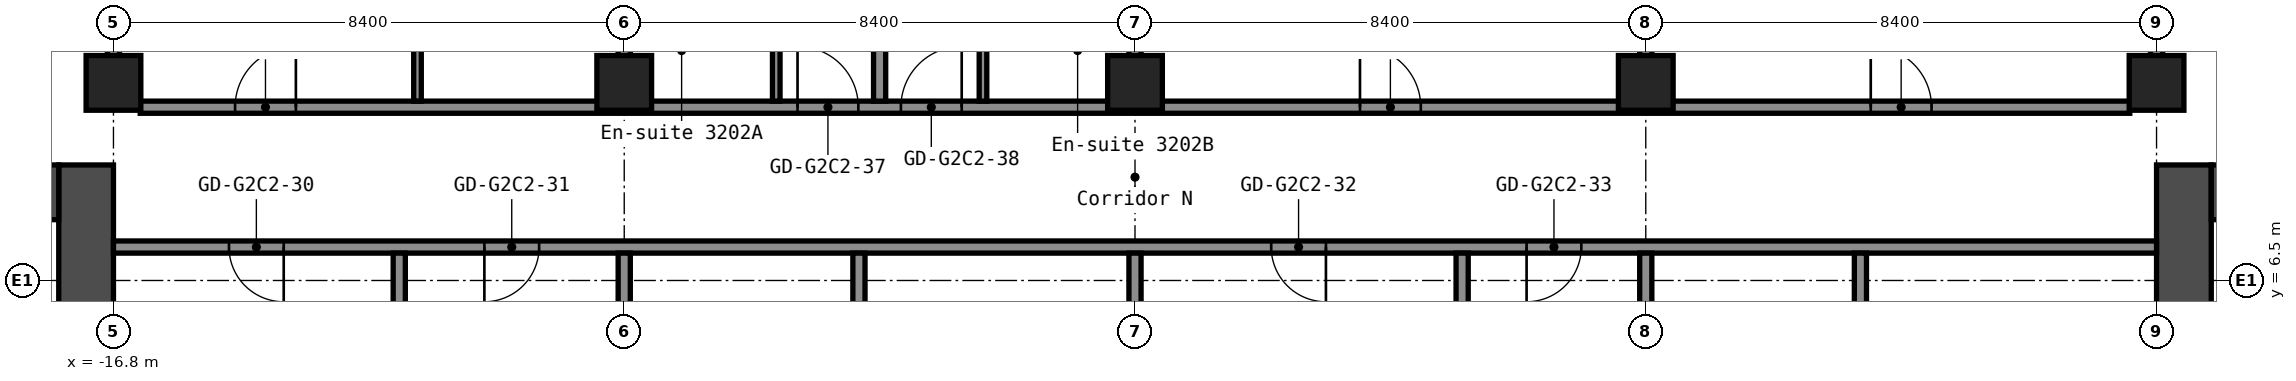
"""IFC4 building model, lengths in metres.
Left out: names, types, materials, properties, quantities, classifications, styles, units other than length and angle.
Written with IfcOpenShell. Run it as: python <this file> out.ifc"""

import sys

from ifc_helpers import new_model, si_unit, direction, frame, frame_2d, origin, origin_2d, place, context, subcontext, project, spatial, rectangle, hollow_rectangle, extrude, element, fill, save


model = new_model("IFC4")
c1 = context("Model", 3, precision=1e-05, world=origin(), true_north=direction((0.0, 1.0)))
c2 = subcontext(c1, "Body", "Model", "MODEL_VIEW")
j1 = project(units=[si_unit("LENGTHUNIT", "METRE"), si_unit("PLANEANGLEUNIT", "RADIAN")], contexts=[c1])
p1 = place(None, origin())
s1 = spatial("IfcSite", under=j1, at=p1, CompositionType="ELEMENT")
p2 = place(p1, origin())
s2 = spatial("IfcBuilding", under=s1, at=p2, CompositionType="ELEMENT")
p3 = place(p2, frame((0.0, 0.0, 113.8)))
s3 = spatial("IfcBuildingStorey", under=s2, at=p3, CompositionType="ELEMENT", Elevation=113.8)
for number, where, z_axis, x_axis in (
    (1, (-16.8, 9.75, 0.0), (0.0, 0.0, 1.0), (1.0, 0.0, 0.0)),
    (2, (-8.4, 9.75, 0.0), (0.0, 0.0, 1.0), (1.0, 0.0, 0.0)),
    (3, (0.0, 9.75, 0.0), (0.0, 0.0, 1.0), (1.0, 0.0, 0.0)),
    (4, (8.4, 9.75, 0.0), (0.0, 0.0, 1.0), (1.0, 0.0, 0.0)),
    (5, (16.8, 9.75, 0.0), (0.0, 0.0, 1.0), (1.0, 0.0, 0.0)),
):
    element("IfcColumn", number, at=place(p3, frame(where, z_axis=z_axis, x_axis=x_axis)), inside=s3, PredefinedType="COLUMN", context=c2, shape_type="SweptSolid", body=[
        extrude(hollow_rectangle(XDim=0.9, YDim=0.9, WallThickness=0.036, at=origin_2d()), origin(), (0.0, 0.0, 1.0), 2.8),
    ])
p4 = place(p3, frame((-17.25, -8.4, 0.0), z_axis=(0.0, 0.0, 1.0), x_axis=(0.0, 1.0, 0.0)))
e6 = element("IfcWall", 6, at=p4, inside=s3, PredefinedType="SHEAR", context=c2, shape_type="SweptSolid", body=[
    extrude(rectangle(XDim=16.8, YDim=0.9, at=frame_2d((8.4, 0.0))), origin(), (0.0, 0.0, 1.0), 2.8),
])
p5 = place(p4, frame((7.6, 0.0, 0.0)))
e7 = element("IfcOpeningElement", 7, at=p5, cuts=e6, PredefinedType="OPENING", context=c2, shape_type="SweptSolid", body=[
    extrude(rectangle(XDim=1.2, YDim=2.1, at=frame_2d((0.6, 1.05))), frame((0.0, 0.46, 0.0), z_axis=(0.0, -1.0, 0.0), x_axis=(1.0, 0.0, 0.0)), (0.0, 0.0, 1.0), 0.92),
])
p6 = place(p3, frame((-32.7, 7.95, 0.0), z_axis=(0.0, 0.0, 1.0), x_axis=(1.0, 0.0, 0.0)))
e8 = element("IfcWall", 8, at=p6, inside=s3, PredefinedType="SHEAR", context=c2, shape_type="SweptSolid", body=[
    extrude(rectangle(XDim=15.0, YDim=0.9, at=frame_2d((7.5, 0.0))), origin(), (0.0, 0.0, 1.0), 2.8),
])
p7 = place(p6, frame((3.4, 0.0, 0.0)))
e9 = element("IfcOpeningElement", 9, at=p7, cuts=e8, PredefinedType="OPENING", context=c2, shape_type="SweptSolid", body=[
    extrude(rectangle(XDim=1.2, YDim=2.1, at=frame_2d((0.6, 1.05))), frame((0.0, 0.46, 0.0), z_axis=(0.0, -1.0, 0.0), x_axis=(1.0, 0.0, 0.0)), (0.0, 0.0, 1.0), 0.92),
])
p8 = place(p6, frame((0.75, 0.0, 0.0)))
e10 = element("IfcOpeningElement", 10, at=p8, cuts=e8, PredefinedType="OPENING", context=c2, shape_type="SweptSolid", body=[
    extrude(rectangle(XDim=0.9, YDim=2.1, at=frame_2d((0.45, 1.05))), frame((0.0, 0.46, 0.0), z_axis=(0.0, -1.0, 0.0), x_axis=(1.0, 0.0, 0.0)), (0.0, 0.0, 1.0), 0.92),
])
p9 = place(p3, frame((17.25, -8.4, 0.0), z_axis=(0.0, 0.0, 1.0), x_axis=(0.0, 1.0, 0.0)))
e11 = element("IfcWall", 11, at=p9, inside=s3, PredefinedType="SHEAR", context=c2, shape_type="SweptSolid", body=[
    extrude(rectangle(XDim=16.8, YDim=0.9, at=frame_2d((8.4, 0.0))), origin(), (0.0, 0.0, 1.0), 2.8),
])
p10 = place(p9, frame((7.6, 0.0, 0.0)))
e12 = element("IfcOpeningElement", 12, at=p10, cuts=e11, PredefinedType="OPENING", context=c2, shape_type="SweptSolid", body=[
    extrude(rectangle(XDim=1.2, YDim=2.1, at=frame_2d((0.6, 1.05))), frame((0.0, 0.46, 0.0), z_axis=(0.0, -1.0, 0.0), x_axis=(1.0, 0.0, 0.0)), (0.0, 0.0, 1.0), 0.92),
])
p11 = place(p3, frame((17.7, 7.95, 0.0), z_axis=(0.0, 0.0, 1.0), x_axis=(1.0, 0.0, 0.0)))
e13 = element("IfcWall", 13, at=p11, inside=s3, PredefinedType="SHEAR", context=c2, shape_type="SweptSolid", body=[
    extrude(rectangle(XDim=15.0, YDim=0.9, at=frame_2d((7.5, 0.0))), origin(), (0.0, 0.0, 1.0), 2.8),
])
p12 = place(p11, frame((10.4, 0.0, 0.0)))
e14 = element("IfcOpeningElement", 14, at=p12, cuts=e13, PredefinedType="OPENING", context=c2, shape_type="SweptSolid", body=[
    extrude(rectangle(XDim=1.2, YDim=2.1, at=frame_2d((0.6, 1.05))), frame((0.0, 0.46, 0.0), z_axis=(0.0, -1.0, 0.0), x_axis=(1.0, 0.0, 0.0)), (0.0, 0.0, 1.0), 0.92),
])
p13 = place(p11, frame((13.35, 0.0, 0.0)))
e15 = element("IfcOpeningElement", 15, at=p13, cuts=e13, PredefinedType="OPENING", context=c2, shape_type="SweptSolid", body=[
    extrude(rectangle(XDim=0.9, YDim=2.1, at=frame_2d((0.45, 1.05))), frame((0.0, 0.46, 0.0), z_axis=(0.0, -1.0, 0.0), x_axis=(1.0, 0.0, 0.0)), (0.0, 0.0, 1.0), 0.92),
])
p14 = place(p3, frame((-16.8, 7.05, 0.0), z_axis=(0.0, 0.0, 1.0), x_axis=(1.0, 0.0, 0.0)))
e16 = element("IfcWall", 16, at=p14, inside=s3, PredefinedType="PARTITIONING", context=c2, shape_type="SweptSolid", body=[
    extrude(rectangle(XDim=33.6, YDim=0.2, at=frame_2d((16.8, 0.0))), origin(), (0.0, 0.0, 1.0), 2.8),
])
p15 = place(p14, frame((1.9, 0.0, 0.0)))
e17 = element("IfcOpeningElement", 17, at=p15, cuts=e16, PredefinedType="OPENING", context=c2, shape_type="SweptSolid", body=[
    extrude(rectangle(XDim=0.9, YDim=2.1, at=frame_2d((0.45, 1.05))), frame((0.0, 0.11, 0.0), z_axis=(0.0, -1.0, 0.0), x_axis=(1.0, 0.0, 0.0)), (0.0, 0.0, 1.0), 0.22),
])
p16 = place(p14, frame((6.1, 0.0, 0.0)))
e18 = element("IfcOpeningElement", 18, at=p16, cuts=e16, PredefinedType="OPENING", context=c2, shape_type="SweptSolid", body=[
    extrude(rectangle(XDim=0.9, YDim=2.1, at=frame_2d((0.45, 1.05))), frame((0.0, 0.11, 0.0), z_axis=(0.0, -1.0, 0.0), x_axis=(1.0, 0.0, 0.0)), (0.0, 0.0, 1.0), 0.22),
])
p17 = place(p14, frame((19.04, 0.0, 0.0)))
e19 = element("IfcOpeningElement", 19, at=p17, cuts=e16, PredefinedType="OPENING", context=c2, shape_type="SweptSolid", body=[
    extrude(rectangle(XDim=0.9, YDim=2.1, at=frame_2d((0.45, 1.05))), frame((0.0, 0.11, 0.0), z_axis=(0.0, -1.0, 0.0), x_axis=(1.0, 0.0, 0.0)), (0.0, 0.0, 1.0), 0.22),
])
p18 = place(p14, frame((23.24, 0.0, 0.0)))
e20 = element("IfcOpeningElement", 20, at=p18, cuts=e16, PredefinedType="OPENING", context=c2, shape_type="SweptSolid", body=[
    extrude(rectangle(XDim=0.9, YDim=2.1, at=frame_2d((0.45, 1.05))), frame((0.0, 0.11, 0.0), z_axis=(0.0, -1.0, 0.0), x_axis=(1.0, 0.0, 0.0)), (0.0, 0.0, 1.0), 0.22),
])
p19 = place(p3, frame((-16.36, 9.35, 0.0), z_axis=(0.0, 0.0, 1.0), x_axis=(1.0, 0.0, 0.0)))
e21 = element("IfcWall", 21, at=p19, inside=s3, PredefinedType="PARTITIONING", context=c2, shape_type="SweptSolid", body=[
    extrude(rectangle(XDim=32.72, YDim=0.2, at=frame_2d((16.36, 0.0))), origin(), (0.0, 0.0, 1.0), 2.8),
])
p20 = place(p19, frame((1.56, 0.0, 0.0)))
e22 = element("IfcOpeningElement", 22, at=p20, cuts=e21, PredefinedType="OPENING", context=c2, shape_type="SweptSolid", body=[
    extrude(rectangle(XDim=1.0, YDim=2.1, at=frame_2d((0.5, 1.05))), frame((0.0, 0.11, 0.0), z_axis=(0.0, -1.0, 0.0), x_axis=(1.0, 0.0, 0.0)), (0.0, 0.0, 1.0), 0.22),
])
p21 = place(p19, frame((10.81, 0.0, 0.0)))
e23 = element("IfcOpeningElement", 23, at=p21, cuts=e21, PredefinedType="OPENING", context=c2, shape_type="SweptSolid", body=[
    extrude(rectangle(XDim=1.0, YDim=2.1, at=frame_2d((0.5, 1.05))), frame((0.0, 0.11, 0.0), z_axis=(0.0, -1.0, 0.0), x_axis=(1.0, 0.0, 0.0)), (0.0, 0.0, 1.0), 0.22),
])
p22 = place(p19, frame((12.51, 0.0, 0.0)))
e24 = element("IfcOpeningElement", 24, at=p22, cuts=e21, PredefinedType="OPENING", context=c2, shape_type="SweptSolid", body=[
    extrude(rectangle(XDim=1.0, YDim=2.1, at=frame_2d((0.5, 1.05))), frame((0.0, 0.11, 0.0), z_axis=(0.0, -1.0, 0.0), x_axis=(1.0, 0.0, 0.0)), (0.0, 0.0, 1.0), 0.22),
])
p23 = place(p19, frame((20.06, 0.0, 0.0)))
e25 = element("IfcOpeningElement", 25, at=p23, cuts=e21, PredefinedType="OPENING", context=c2, shape_type="SweptSolid", body=[
    extrude(rectangle(XDim=1.0, YDim=2.1, at=frame_2d((0.5, 1.05))), frame((0.0, 0.11, 0.0), z_axis=(0.0, -1.0, 0.0), x_axis=(1.0, 0.0, 0.0)), (0.0, 0.0, 1.0), 0.22),
])
p24 = place(p19, frame((28.46, 0.0, 0.0)))
e26 = element("IfcOpeningElement", 26, at=p24, cuts=e21, PredefinedType="OPENING", context=c2, shape_type="SweptSolid", body=[
    extrude(rectangle(XDim=1.0, YDim=2.1, at=frame_2d((0.5, 1.05))), frame((0.0, 0.11, 0.0), z_axis=(0.0, -1.0, 0.0), x_axis=(1.0, 0.0, 0.0)), (0.0, 0.0, 1.0), 0.22),
])
p25 = place(p3, frame((-16.8, 10.19, 0.0), z_axis=(0.0, 0.0, 1.0), x_axis=(0.0, 1.0, 0.0)))
e27 = element("IfcWall", 27, at=p25, inside=s3, PredefinedType="PARTITIONING", context=c2, shape_type="SweptSolid", body=[
    extrude(rectangle(XDim=13.36, YDim=0.2, at=frame_2d((6.68, 0.0))), origin(), (0.0, 0.0, 1.0), 2.8),
])
p26 = place(p3, frame((-12.1, 1.05, 0.0), z_axis=(0.0, 0.0, 1.0), x_axis=(0.0, 1.0, 0.0)))
e28 = element("IfcWall", 28, at=p26, inside=s3, PredefinedType="PARTITIONING", context=c2, shape_type="SweptSolid", body=[
    extrude(rectangle(XDim=5.9, YDim=0.2, at=frame_2d((2.95, 0.0))), origin(), (0.0, 0.0, 1.0), 2.8),
])
p27 = place(p3, frame((-11.8, 9.45, 0.0), z_axis=(0.0, 0.0, 1.0), x_axis=(0.0, 1.0, 0.0)))
e29 = element("IfcWall", 29, at=p27, inside=s3, PredefinedType="PARTITIONING", context=c2, shape_type="SweptSolid", body=[
    extrude(rectangle(XDim=3.3, YDim=0.125, at=frame_2d((1.65, 0.0))), origin(), (0.0, 0.0, 1.0), 2.8),
])
p28 = place(p3, frame((-8.4, 1.05, 0.0), z_axis=(0.0, 0.0, 1.0), x_axis=(0.0, 1.0, 0.0)))
e30 = element("IfcWall", 30, at=p28, inside=s3, PredefinedType="PARTITIONING", context=c2, shape_type="SweptSolid", body=[
    extrude(rectangle(XDim=5.9, YDim=0.2, at=frame_2d((2.95, 0.0))), origin(), (0.0, 0.0, 1.0), 2.8),
])
p29 = place(p3, frame((-8.4, 10.19, 0.0), z_axis=(0.0, 0.0, 1.0), x_axis=(0.0, 1.0, 0.0)))
e31 = element("IfcWall", 31, at=p29, inside=s3, PredefinedType="PARTITIONING", context=c2, shape_type="SweptSolid", body=[
    extrude(rectangle(XDim=13.36, YDim=0.2, at=frame_2d((6.68, 0.0))), origin(), (0.0, 0.0, 1.0), 2.8),
])
p30 = place(p3, frame((-5.9, 9.45, 0.0), z_axis=(0.0, 0.0, 1.0), x_axis=(0.0, 1.0, 0.0)))
e32 = element("IfcWall", 32, at=p30, inside=s3, PredefinedType="PARTITIONING", context=c2, shape_type="SweptSolid", body=[
    extrude(rectangle(XDim=2.9, YDim=0.125, at=frame_2d((1.45, 0.0))), origin(), (0.0, 0.0, 1.0), 2.8),
])
p31 = place(p30, frame((1.5, 0.0, 0.0)))
e33 = element("IfcOpeningElement", 33, at=p31, cuts=e32, PredefinedType="OPENING", context=c2, shape_type="SweptSolid", body=[
    extrude(rectangle(XDim=0.8, YDim=2.1, at=frame_2d((0.4, 1.05))), frame((0.0, 0.073, 0.0), z_axis=(0.0, -1.0, 0.0), x_axis=(1.0, 0.0, 0.0)), (0.0, 0.0, 1.0), 0.145),
])
p32 = place(p3, frame((-4.54, 1.05, 0.0), z_axis=(0.0, 0.0, 1.0), x_axis=(0.0, 1.0, 0.0)))
e34 = element("IfcWall", 34, at=p32, inside=s3, PredefinedType="PARTITIONING", context=c2, shape_type="SweptSolid", body=[
    extrude(rectangle(XDim=5.9, YDim=0.2, at=frame_2d((2.95, 0.0))), origin(), (0.0, 0.0, 1.0), 2.8),
])
p33 = place(p3, frame((-4.2, 9.45, 0.0), z_axis=(0.0, 0.0, 1.0), x_axis=(0.0, 1.0, 0.0)))
e35 = element("IfcWall", 35, at=p33, inside=s3, PredefinedType="PARTITIONING", context=c2, shape_type="SweptSolid", body=[
    extrude(rectangle(XDim=14.1, YDim=0.2, at=frame_2d((7.05, 0.0))), origin(), (0.0, 0.0, 1.0), 2.8),
])
p34 = place(p3, frame((-2.5, 9.45, 0.0), z_axis=(0.0, 0.0, 1.0), x_axis=(0.0, 1.0, 0.0)))
e36 = element("IfcWall", 36, at=p34, inside=s3, PredefinedType="PARTITIONING", context=c2, shape_type="SweptSolid", body=[
    extrude(rectangle(XDim=2.9, YDim=0.125, at=frame_2d((1.45, 0.0))), origin(), (0.0, 0.0, 1.0), 2.8),
])
p35 = place(p34, frame((1.5, 0.0, 0.0)))
e37 = element("IfcOpeningElement", 37, at=p35, cuts=e36, PredefinedType="OPENING", context=c2, shape_type="SweptSolid", body=[
    extrude(rectangle(XDim=0.8, YDim=2.1, at=frame_2d((0.4, 1.05))), frame((0.0, 0.073, 0.0), z_axis=(0.0, -1.0, 0.0), x_axis=(1.0, 0.0, 0.0)), (0.0, 0.0, 1.0), 0.145),
])
p36 = place(p3, frame((0.0, 1.05, 0.0), z_axis=(0.0, 0.0, 1.0), x_axis=(0.0, 1.0, 0.0)))
e38 = element("IfcWall", 38, at=p36, inside=s3, PredefinedType="PARTITIONING", context=c2, shape_type="SweptSolid", body=[
    extrude(rectangle(XDim=5.9, YDim=0.2, at=frame_2d((2.95, 0.0))), origin(), (0.0, 0.0, 1.0), 2.8),
])
p37 = place(p3, frame((0.0, 10.19, 0.0), z_axis=(0.0, 0.0, 1.0), x_axis=(0.0, 1.0, 0.0)))
e39 = element("IfcWall", 39, at=p37, inside=s3, PredefinedType="PARTITIONING", context=c2, shape_type="SweptSolid", body=[
    extrude(rectangle(XDim=13.36, YDim=0.2, at=frame_2d((6.68, 0.0))), origin(), (0.0, 0.0, 1.0), 2.8),
])
for number, where, z_axis, x_axis in (
    (40, (5.38, 1.05, 0.0), (0.0, 0.0, 1.0), (0.0, 1.0, 0.0)),
    (41, (8.4, 1.05, 0.0), (0.0, 0.0, 1.0), (0.0, 1.0, 0.0)),
):
    element("IfcWall", number, at=place(p3, frame(where, z_axis=z_axis, x_axis=x_axis)), inside=s3, PredefinedType="PARTITIONING", context=c2, shape_type="SweptSolid", body=[
        extrude(rectangle(XDim=5.9, YDim=0.2, at=frame_2d((2.95, 0.0))), origin(), (0.0, 0.0, 1.0), 2.8),
    ])
p38 = place(p3, frame((8.4, 10.19, 0.0), z_axis=(0.0, 0.0, 1.0), x_axis=(0.0, 1.0, 0.0)))
e42 = element("IfcWall", 42, at=p38, inside=s3, PredefinedType="PARTITIONING", context=c2, shape_type="SweptSolid", body=[
    extrude(rectangle(XDim=13.36, YDim=0.2, at=frame_2d((6.68, 0.0))), origin(), (0.0, 0.0, 1.0), 2.8),
])
p39 = place(p3, frame((11.93, 1.05, 0.0), z_axis=(0.0, 0.0, 1.0), x_axis=(0.0, 1.0, 0.0)))
e43 = element("IfcWall", 43, at=p39, inside=s3, PredefinedType="PARTITIONING", context=c2, shape_type="SweptSolid", body=[
    extrude(rectangle(XDim=5.9, YDim=0.2, at=frame_2d((2.95, 0.0))), origin(), (0.0, 0.0, 1.0), 2.8),
])
p40 = place(p3, frame((16.8, 10.19, 0.0), z_axis=(0.0, 0.0, 1.0), x_axis=(0.0, 1.0, 0.0)))
e44 = element("IfcWall", 44, at=p40, inside=s3, PredefinedType="PARTITIONING", context=c2, shape_type="SweptSolid", body=[
    extrude(rectangle(XDim=13.36, YDim=0.2, at=frame_2d((6.68, 0.0))), origin(), (0.0, 0.0, 1.0), 2.8),
])
p41 = place(p15, origin())
e45 = element("IfcDoor", 45, at=p41, inside=s3, OperationType="SINGLE_SWING_RIGHT", PredefinedType="DOOR", context=c2, shape_type="SweptSolid", body=[
    extrude(rectangle(XDim=0.9, YDim=2.1, at=frame_2d((0.45, 1.05))), frame((0.0, 0.025, 0.0), z_axis=(0.0, -1.0, 0.0), x_axis=(1.0, 0.0, 0.0)), (0.0, 0.0, 1.0), 0.05),
])
fill(e17, e45)
p42 = place(p16, origin())
e46 = element("IfcDoor", 46, at=p42, inside=s3, OperationType="SINGLE_SWING_LEFT", PredefinedType="DOOR", context=c2, shape_type="SweptSolid", body=[
    extrude(rectangle(XDim=0.9, YDim=2.1, at=frame_2d((0.45, 1.05))), frame((0.0, 0.025, 0.0), z_axis=(0.0, -1.0, 0.0), x_axis=(1.0, 0.0, 0.0)), (0.0, 0.0, 1.0), 0.05),
])
fill(e18, e46)
p43 = place(p17, origin())
e47 = element("IfcDoor", 47, at=p43, inside=s3, OperationType="SINGLE_SWING_RIGHT", PredefinedType="DOOR", context=c2, shape_type="SweptSolid", body=[
    extrude(rectangle(XDim=0.9, YDim=2.1, at=frame_2d((0.45, 1.05))), frame((0.0, 0.025, 0.0), z_axis=(0.0, -1.0, 0.0), x_axis=(1.0, 0.0, 0.0)), (0.0, 0.0, 1.0), 0.05),
])
fill(e19, e47)
p44 = place(p18, origin())
e48 = element("IfcDoor", 48, at=p44, inside=s3, OperationType="SINGLE_SWING_LEFT", PredefinedType="DOOR", context=c2, shape_type="SweptSolid", body=[
    extrude(rectangle(XDim=0.9, YDim=2.1, at=frame_2d((0.45, 1.05))), frame((0.0, 0.025, 0.0), z_axis=(0.0, -1.0, 0.0), x_axis=(1.0, 0.0, 0.0)), (0.0, 0.0, 1.0), 0.05),
])
fill(e20, e48)
p45 = place(p20, origin())
e49 = element("IfcDoor", 49, at=p45, inside=s3, OperationType="SINGLE_SWING_LEFT", PredefinedType="DOOR", context=c2, shape_type="SweptSolid", body=[
    extrude(rectangle(XDim=1.0, YDim=2.1, at=frame_2d((0.5, 1.05))), frame((0.0, 0.025, 0.0), z_axis=(0.0, -1.0, 0.0), x_axis=(1.0, 0.0, 0.0)), (0.0, 0.0, 1.0), 0.05),
])
fill(e22, e49)
p46 = place(p21, origin())
e50 = element("IfcDoor", 50, at=p46, inside=s3, OperationType="SINGLE_SWING_RIGHT", PredefinedType="DOOR", context=c2, shape_type="SweptSolid", body=[
    extrude(rectangle(XDim=1.0, YDim=2.1, at=frame_2d((0.5, 1.05))), frame((0.0, 0.025, 0.0), z_axis=(0.0, -1.0, 0.0), x_axis=(1.0, 0.0, 0.0)), (0.0, 0.0, 1.0), 0.05),
])
fill(e23, e50)
p47 = place(p22, origin())
e51 = element("IfcDoor", 51, at=p47, inside=s3, OperationType="SINGLE_SWING_LEFT", PredefinedType="DOOR", context=c2, shape_type="SweptSolid", body=[
    extrude(rectangle(XDim=1.0, YDim=2.1, at=frame_2d((0.5, 1.05))), frame((0.0, 0.025, 0.0), z_axis=(0.0, -1.0, 0.0), x_axis=(1.0, 0.0, 0.0)), (0.0, 0.0, 1.0), 0.05),
])
fill(e24, e51)
p48 = place(p23, origin())
e52 = element("IfcDoor", 52, at=p48, inside=s3, OperationType="SINGLE_SWING_RIGHT", PredefinedType="DOOR", context=c2, shape_type="SweptSolid", body=[
    extrude(rectangle(XDim=1.0, YDim=2.1, at=frame_2d((0.5, 1.05))), frame((0.0, 0.025, 0.0), z_axis=(0.0, -1.0, 0.0), x_axis=(1.0, 0.0, 0.0)), (0.0, 0.0, 1.0), 0.05),
])
fill(e25, e52)
p49 = place(p24, origin())
e53 = element("IfcDoor", 53, at=p49, inside=s3, OperationType="SINGLE_SWING_RIGHT", PredefinedType="DOOR", context=c2, shape_type="SweptSolid", body=[
    extrude(rectangle(XDim=1.0, YDim=2.1, at=frame_2d((0.5, 1.05))), frame((0.0, 0.025, 0.0), z_axis=(0.0, -1.0, 0.0), x_axis=(1.0, 0.0, 0.0)), (0.0, 0.0, 1.0), 0.05),
])
fill(e26, e53)
save(model, sys.argv[1])
